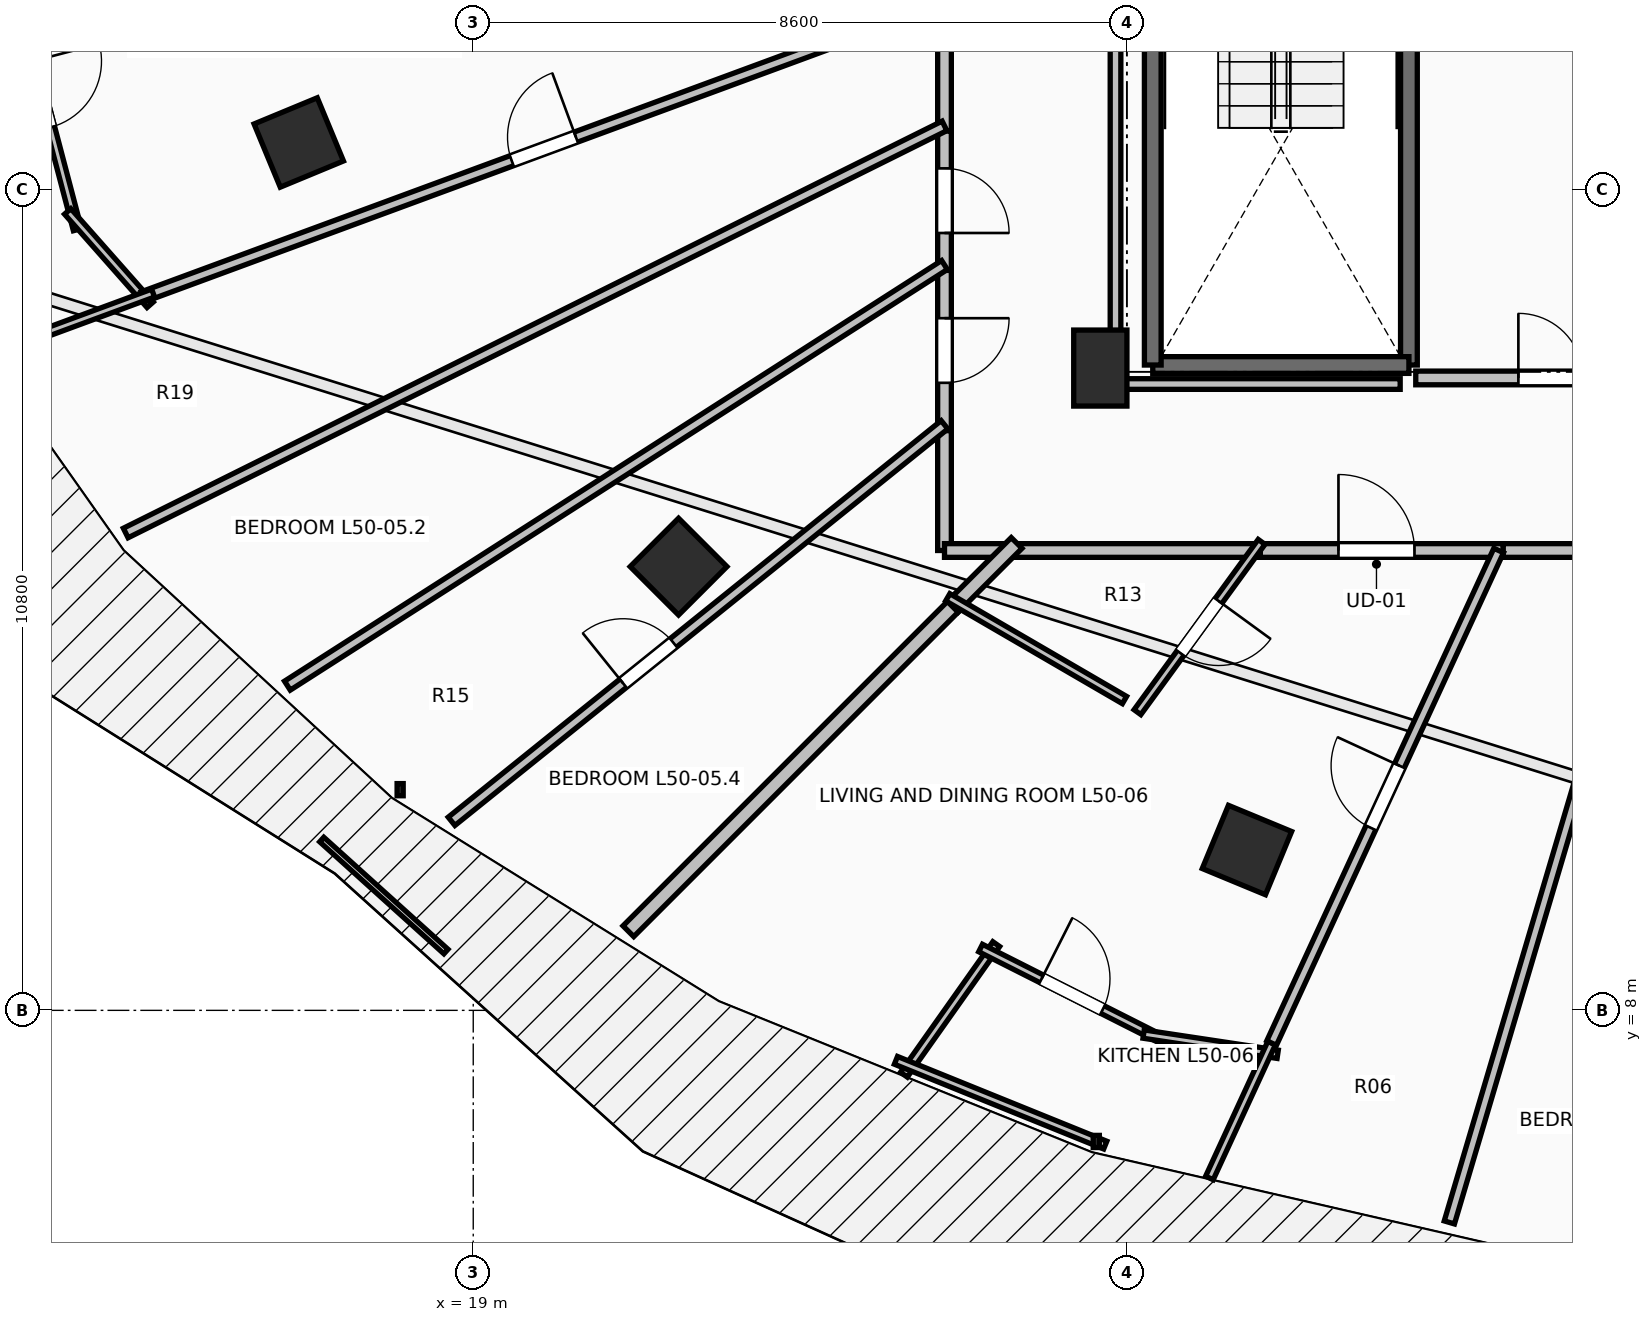
"""IFC4 building model, lengths in metres.
Left out: names, types, materials, properties, quantities, classifications, styles, units other than length and angle.
Written with IfcOpenShell. Run it as: python <this file> out.ifc"""

import sys

from ifc_helpers import new_model, si_unit, direction, frame, frame_2d, origin, origin_2d, place, context, subcontext, project, spatial, rectangle, extrude, element, fill, save


model = new_model("IFC4")
c1 = context("Model", 3, precision=1e-05, world=origin(), true_north=direction((0.0, 1.0)))
c2 = subcontext(c1, "Body", "Model", "MODEL_VIEW")
j1 = project(units=[si_unit("LENGTHUNIT", "METRE"), si_unit("PLANEANGLEUNIT", "RADIAN")], contexts=[c1])
p1 = place(None, origin())
s1 = spatial("IfcSite", under=j1, at=p1, CompositionType="ELEMENT")
p2 = place(p1, origin())
s2 = spatial("IfcBuilding", under=s1, at=p2, CompositionType="ELEMENT")
p3 = place(p2, frame((0.0, 0.0, 186.1)))
s3 = spatial("IfcBuildingStorey", under=s2, at=p3, CompositionType="ELEMENT", Elevation=186.1)
for number, where, z_axis, x_axis in (
    (1, (16.705, 19.418, 0.0), (0.0, 0.0, 1.0), (-0.924, -0.383, 0.0)),
    (2, (21.701, 13.838, 0.0), (0.0, 0.0, 1.0), (-0.707, -0.707, 0.0)),
    (3, (29.179, 10.109, 0.0), (0.0, 0.0, 1.0), (-0.383, -0.924, 0.0)),
):
    element("IfcColumn", number, at=place(p3, frame(where, z_axis=z_axis, x_axis=x_axis)), inside=s3, PredefinedType="COLUMN", context=c2, shape_type="SweptSolid", body=[
        extrude(rectangle(XDim=0.9, YDim=0.9, at=origin_2d()), origin(), (0.0, 0.0, 1.0), 3.5),
    ])
p4 = place(p3, frame((27.25, 16.45, 0.0), z_axis=(0.0, 0.0, 1.0), x_axis=(1.0, 0.0, 0.0)))
e4 = element("IfcColumn", 4, at=p4, inside=s3, PredefinedType="PILASTER", context=c2, shape_type="SweptSolid", body=[
    extrude(rectangle(XDim=0.7, YDim=1.0, at=origin_2d()), origin(), (0.0, 0.0, 1.0), 3.5),
])
p5 = place(p3, frame((31.31, 23.91, 0.0), z_axis=(0.0, 0.0, 1.0), x_axis=(0.0, -1.0, 0.0)))
e5 = element("IfcWall", 5, at=p5, inside=s3, PredefinedType="SOLIDWALL", context=c2, shape_type="SweptSolid", body=[
    extrude(rectangle(XDim=7.42, YDim=0.22, at=frame_2d((3.71, 0.0))), origin(), (0.0, 0.0, 1.0), 3.24),
])
p6 = place(p3, frame((31.31, 16.49, 0.0), z_axis=(0.0, 0.0, 1.0), x_axis=(-1.0, 0.0, 0.0)))
e6 = element("IfcWall", 6, at=p6, inside=s3, PredefinedType="SOLIDWALL", context=c2, shape_type="SweptSolid", body=[
    extrude(rectangle(XDim=3.37, YDim=0.22, at=frame_2d((1.685, 0.0))), origin(), (0.0, 0.0, 1.0), 3.24),
])
p7 = place(p3, frame((27.94, 16.49, 0.0), z_axis=(0.0, 0.0, 1.0), x_axis=(0.0, 1.0, 0.0)))
e7 = element("IfcWall", 7, at=p7, inside=s3, PredefinedType="SOLIDWALL", context=c2, shape_type="SweptSolid", body=[
    extrude(rectangle(XDim=7.42, YDim=0.22, at=frame_2d((3.71, 0.0))), origin(), (0.0, 0.0, 1.0), 3.24),
])
p8 = place(p3, frame((31.4, 16.32, 0.0), z_axis=(0.0, 0.0, 1.0), x_axis=(1.0, 0.0, 0.0)))
e8 = element("IfcWall", 8, at=p8, inside=s3, PredefinedType="PARTITIONING", context=c2, shape_type="SweptSolid", body=[
    extrude(rectangle(XDim=3.55, YDim=0.18, at=frame_2d((1.775, 0.0))), origin(), (0.0, 0.0, 1.0), 3.24),
])
p9 = place(p8, frame((1.35, 0.0, 0.0)))
e9 = element("IfcOpeningElement", 9, at=p9, cuts=e8, PredefinedType="OPENING", context=c2, shape_type="SweptSolid", body=[
    extrude(rectangle(XDim=0.85, YDim=2.1, at=frame_2d((0.425, 1.05))), frame((0.0, 0.105, 0.0), z_axis=(0.0, -1.0, 0.0), x_axis=(1.0, 0.0, 0.0)), (0.0, 0.0, 1.0), 0.21),
])
p10 = place(p3, frame((25.2, 21.214, 0.0), z_axis=(0.0, 0.0, 1.0), x_axis=(0.0, -1.0, 0.0)))
e10 = element("IfcWall", 10, at=p10, inside=s3, PredefinedType="PARTITIONING", context=c2, shape_type="SweptSolid", body=[
    extrude(rectangle(XDim=1.645, YDim=0.18, at=frame_2d((0.823, 0.0))), origin(), (0.0, 0.0, 1.0), 3.24),
])
p11 = place(p3, frame((25.2, 19.569, 0.0), z_axis=(0.0, 0.0, 1.0), x_axis=(0.0, -1.0, 0.0)))
e11 = element("IfcWall", 11, at=p11, inside=s3, PredefinedType="PARTITIONING", context=c2, shape_type="SweptSolid", body=[
    extrude(rectangle(XDim=1.834, YDim=0.18, at=frame_2d((0.917, 0.0))), origin(), (0.0, 0.0, 1.0), 3.24),
])
p12 = place(p11, frame((0.492, 0.0, 0.0)))
e12 = element("IfcOpeningElement", 12, at=p12, cuts=e11, PredefinedType="OPENING", context=c2, shape_type="SweptSolid", body=[
    extrude(rectangle(XDim=0.85, YDim=2.1, at=frame_2d((0.425, 1.05))), frame((0.0, 0.105, 0.0), z_axis=(0.0, -1.0, 0.0), x_axis=(1.0, 0.0, 0.0)), (0.0, 0.0, 1.0), 0.21),
])
p13 = place(p3, frame((25.2, 17.735, 0.0), z_axis=(0.0, 0.0, 1.0), x_axis=(0.0, -1.0, 0.0)))
e13 = element("IfcWall", 13, at=p13, inside=s3, PredefinedType="PARTITIONING", context=c2, shape_type="SweptSolid", body=[
    extrude(rectangle(XDim=2.108, YDim=0.18, at=frame_2d((1.054, 0.0))), origin(), (0.0, 0.0, 1.0), 2.432),
])
p14 = place(p13, frame((0.629, 0.0, 0.0)))
e14 = element("IfcOpeningElement", 14, at=p14, cuts=e13, PredefinedType="OPENING", context=c2, shape_type="SweptSolid", body=[
    extrude(rectangle(XDim=0.85, YDim=2.1, at=frame_2d((0.425, 1.05))), frame((0.0, 0.105, 0.0), z_axis=(0.0, -1.0, 0.0), x_axis=(1.0, 0.0, 0.0)), (0.0, 0.0, 1.0), 0.21),
])
p15 = place(p3, frame((25.2, 15.627, 0.0), z_axis=(0.0, 0.0, 1.0), x_axis=(0.0, -1.0, 0.0)))
e15 = element("IfcWall", 15, at=p15, inside=s3, PredefinedType="PARTITIONING", context=c2, shape_type="SweptSolid", body=[
    extrude(rectangle(XDim=1.577, YDim=0.18, at=frame_2d((0.789, 0.0))), origin(), (0.0, 0.0, 1.0), 2.432),
])
p16 = place(p3, frame((25.2, 14.05, 0.0), z_axis=(0.0, 0.0, 1.0), x_axis=(1.0, 0.0, 0.0)))
e16 = element("IfcWall", 16, at=p16, inside=s3, PredefinedType="PARTITIONING", context=c2, shape_type="SweptSolid", body=[
    extrude(rectangle(XDim=0.91, YDim=0.18, at=frame_2d((0.455, 0.0))), origin(), (0.0, 0.0, 1.0), 2.874),
])
p17 = place(p3, frame((29.215, 14.05, 0.0), z_axis=(0.0, 0.0, 1.0), x_axis=(1.0, 0.0, 0.0)))
e17 = element("IfcWall", 17, at=p17, inside=s3, PredefinedType="PARTITIONING", context=c2, shape_type="SweptSolid", body=[
    extrude(rectangle(XDim=3.336, YDim=0.18, at=frame_2d((1.668, 0.0))), origin(), (0.0, 0.0, 1.0), 3.24),
])
p18 = place(p17, frame((1.168, 0.0, 0.0)))
e18 = element("IfcOpeningElement", 18, at=p18, cuts=e17, PredefinedType="OPENING", context=c2, shape_type="SweptSolid", body=[
    extrude(rectangle(XDim=1.0, YDim=2.15, at=frame_2d((0.5, 1.075))), frame((0.0, 0.105, 0.0), z_axis=(0.0, -1.0, 0.0), x_axis=(1.0, 0.0, 0.0)), (0.0, 0.0, 1.0), 0.21),
])
p19 = place(p3, frame((25.97, 14.05, 0.0), z_axis=(0.0, 0.0, 1.0), x_axis=(1.0, 0.0, 0.0)))
e19 = element("IfcWall", 19, at=p19, inside=s3, PredefinedType="PARTITIONING", context=c2, shape_type="SweptSolid", body=[
    extrude(rectangle(XDim=3.385, YDim=0.18, at=frame_2d((1.692, 0.0))), origin(), (0.0, 0.0, 1.0), 2.432),
])
p20 = place(p3, frame((32.551, 14.05, 0.0), z_axis=(0.0, 0.0, 1.0), x_axis=(1.0, 0.0, 0.0)))
e20 = element("IfcWall", 20, at=p20, inside=s3, PredefinedType="PARTITIONING", context=c2, shape_type="SweptSolid", body=[
    extrude(rectangle(XDim=1.969, YDim=0.18, at=frame_2d((0.984, 0.0))), origin(), (0.0, 0.0, 1.0), 3.24),
])
p21 = place(p3, frame((12.855, 21.834, 0.0), z_axis=(0.0, 0.0, 1.0), x_axis=(0.254271540361, -0.967132867688, 0.0)))
e21 = element("IfcWall", 21, at=p21, inside=s3, PredefinedType="PARTITIONING", context=c2, shape_type="SweptSolid", body=[
    extrude(rectangle(XDim=3.685, YDim=0.11, at=frame_2d((1.843, 0.0))), origin(), (0.0, 0.0, 1.0), 3.24),
])
p22 = place(p21, frame((1.393, 0.0, 0.0)))
e22 = element("IfcOpeningElement", 22, at=p22, cuts=e21, PredefinedType="OPENING", context=c2, shape_type="SweptSolid", body=[
    extrude(rectangle(XDim=0.9, YDim=2.1, at=frame_2d((0.45, 1.05))), frame((0.0, 0.07, 0.0), z_axis=(0.0, -1.0, 0.0), x_axis=(1.0, 0.0, 0.0)), (0.0, 0.0, 1.0), 0.14),
])
p23 = place(p3, frame((13.664, 18.511, 0.0), z_axis=(0.0, 0.0, 1.0), x_axis=(0.662345628205, -0.749198417509, 0.0)))
e23 = element("IfcWall", 23, at=p23, inside=s3, PredefinedType="PARTITIONING", context=c2, shape_type="SweptSolid", body=[
    extrude(rectangle(XDim=1.639, YDim=0.11, at=frame_2d((0.819, 0.0))), origin(), (0.0, 0.0, 1.0), 3.24),
])
p24 = place(p3, frame((14.657, 17.388, 0.0), z_axis=(0.0, 0.0, 1.0), x_axis=(0.938173124492, 0.346166417322, 0.0)))
e24 = element("IfcWall", 24, at=p24, inside=s3, PredefinedType="PARTITIONING", context=c2, shape_type="SweptSolid", body=[
    extrude(rectangle(XDim=11.238, YDim=0.14, at=frame_2d((5.619, 0.0))), origin(), (0.0, 0.0, 1.0), 2.432),
])
p25 = place(p24, frame((5.169, 0.0, 0.0)))
e25 = element("IfcOpeningElement", 25, at=p25, cuts=e24, PredefinedType="OPENING", context=c2, shape_type="SweptSolid", body=[
    extrude(rectangle(XDim=0.9, YDim=2.1, at=frame_2d((0.45, 1.05))), frame((0.0, 0.085, 0.0), z_axis=(0.0, -1.0, 0.0), x_axis=(1.0, 0.0, 0.0)), (0.0, 0.0, 1.0), 0.17),
])
p26 = place(p3, frame((12.604, 16.631, 0.0), z_axis=(0.0, 0.0, 1.0), x_axis=(0.938194450562, 0.346108614361, 0.0)))
e26 = element("IfcWall", 26, at=p26, inside=s3, PredefinedType="PARTITIONING", context=c2, shape_type="SweptSolid", body=[
    extrude(rectangle(XDim=2.328, YDim=0.11, at=frame_2d((1.164, 0.0))), origin(), (0.0, 0.0, 1.0), 3.24),
])
p27 = place(p3, frame((14.428, 14.28, 0.0), z_axis=(0.0, 0.0, 1.0), x_axis=(0.895423439435, 0.44521552546, 0.0)))
e27 = element("IfcWall", 27, at=p27, inside=s3, PredefinedType="PARTITIONING", context=c2, shape_type="SweptSolid", body=[
    extrude(rectangle(XDim=12.03, YDim=0.14, at=frame_2d((6.015, 0.0))), origin(), (0.0, 0.0, 1.0), 2.432),
])
p28 = place(p3, frame((16.555, 12.272, 0.0), z_axis=(0.0, 0.0, 1.0), x_axis=(0.842221721565, 0.539131312135, 0.0)))
e28 = element("IfcWall", 28, at=p28, inside=s3, PredefinedType="PARTITIONING", context=c2, shape_type="SweptSolid", body=[
    extrude(rectangle(XDim=10.265, YDim=0.14, at=frame_2d((5.132, 0.0))), origin(), (0.0, 0.0, 1.0), 2.432),
])
p29 = place(p3, frame((18.715, 10.487, 0.0), z_axis=(0.0, 0.0, 1.0), x_axis=(0.779157389419, 0.626828335762, 0.0)))
e29 = element("IfcWall", 29, at=p29, inside=s3, PredefinedType="PARTITIONING", context=c2, shape_type="SweptSolid", body=[
    extrude(rectangle(XDim=8.323, YDim=0.14, at=frame_2d((4.162, 0.0))), origin(), (0.0, 0.0, 1.0), 2.432),
])
p30 = place(p29, frame((2.896, 0.0, 0.0)))
e30 = element("IfcOpeningElement", 30, at=p30, cuts=e29, PredefinedType="OPENING", context=c2, shape_type="SweptSolid", body=[
    extrude(rectangle(XDim=0.85, YDim=2.1, at=frame_2d((0.425, 1.05))), frame((0.0, 0.085, 0.0), z_axis=(0.0, -1.0, 0.0), x_axis=(1.0, 0.0, 0.0)), (0.0, 0.0, 1.0), 0.17),
])
p31 = place(p3, frame((21.041, 9.041, 0.0), z_axis=(0.0, 0.0, 1.0), x_axis=(0.707106781187, 0.707106781187, 0.0)))
e31 = element("IfcWall", 31, at=p31, inside=s3, PredefinedType="PARTITIONING", context=c2, shape_type="SweptSolid", body=[
    extrude(rectangle(XDim=6.176, YDim=0.2, at=frame_2d((3.088, 0.0))), origin(), (0.0, 0.0, 1.0), 2.774),
])
p32 = place(p3, frame((25.309, 13.309, 0.0), z_axis=(0.0, 0.0, 1.0), x_axis=(0.707106781187, 0.707106781187, 0.0)))
e32 = element("IfcWall", 32, at=p32, inside=s3, PredefinedType="PARTITIONING", context=c2, shape_type="SweptSolid", body=[
    extrude(rectangle(XDim=1.188, YDim=0.2, at=frame_2d((0.594, 0.0))), origin(), (0.0, 0.0, 1.0), 2.874),
])
p33 = place(p3, frame((29.372, 14.163, 0.0), z_axis=(0.0, 0.0, 1.0), x_axis=(-0.589066743954, -0.808084383693, 0.0)))
e33 = element("IfcWall", 33, at=p33, inside=s3, PredefinedType="PARTITIONING", context=c2, shape_type="SweptSolid", body=[
    extrude(rectangle(XDim=2.772, YDim=0.11, at=frame_2d((1.386, 0.0))), origin(), (0.0, 0.0, 1.0), 2.432),
])
p34 = place(p33, frame((0.961, 0.0, 0.0)))
e34 = element("IfcOpeningElement", 34, at=p34, cuts=e33, PredefinedType="OPENING", context=c2, shape_type="SweptSolid", body=[
    extrude(rectangle(XDim=0.85, YDim=2.1, at=frame_2d((0.425, 1.05))), frame((0.0, 0.07, 0.0), z_axis=(0.0, -1.0, 0.0), x_axis=(1.0, 0.0, 0.0)), (0.0, 0.0, 1.0), 0.14),
])
p35 = place(p3, frame((27.568, 12.083, 0.0), z_axis=(0.0, 0.0, 1.0), x_axis=(-0.864515441931, 0.502606258082, 0.0)))
e35 = element("IfcWall", 35, at=p35, inside=s3, PredefinedType="PARTITIONING", context=c2, shape_type="SweptSolid", body=[
    extrude(rectangle(XDim=2.69, YDim=0.11, at=frame_2d((1.345, 0.0))), origin(), (0.0, 0.0, 1.0), 3.24),
])
p36 = place(p3, frame((24.666, 7.154, 0.0), z_axis=(0.0, 0.0, 1.0), x_axis=(0.577389248155, 0.816469017241, 0.0)))
e36 = element("IfcWall", 36, at=p36, inside=s3, PredefinedType="PARTITIONING", context=c2, shape_type="SweptSolid", body=[
    extrude(rectangle(XDim=2.104, YDim=0.11, at=frame_2d((1.052, 0.0))), origin(), (0.0, 0.0, 1.0), 3.24),
])
p37 = place(p3, frame((25.675, 8.82, 0.0), z_axis=(0.0, 0.0, 1.0), x_axis=(0.892628057427, -0.450793911999, 0.0)))
e37 = element("IfcWall", 37, at=p37, inside=s3, PredefinedType="PARTITIONING", context=c2, shape_type="SweptSolid", body=[
    extrude(rectangle(XDim=2.698, YDim=0.11, at=frame_2d((1.349, 0.0))), origin(), (0.0, 0.0, 1.0), 3.24),
])
p38 = place(p37, frame((0.899, 0.0, 0.0)))
e38 = element("IfcOpeningElement", 38, at=p38, cuts=e37, PredefinedType="OPENING", context=c2, shape_type="SweptSolid", body=[
    extrude(rectangle(XDim=0.9, YDim=2.1, at=frame_2d((0.45, 1.05))), frame((0.0, 0.07, 0.0), z_axis=(0.0, -1.0, 0.0), x_axis=(1.0, 0.0, 0.0)), (0.0, 0.0, 1.0), 0.14),
])
p39 = place(p3, frame((27.82, 7.688, 0.0), z_axis=(0.0, 0.0, 1.0), x_axis=(0.988830695744, -0.149043131857, 0.0)))
e39 = element("IfcWall", 39, at=p39, inside=s3, PredefinedType="PARTITIONING", context=c2, shape_type="SweptSolid", body=[
    extrude(rectangle(XDim=1.784, YDim=0.11, at=frame_2d((0.892, 0.0))), origin(), (0.0, 0.0, 1.0), 3.24),
])
p40 = place(p3, frame((29.504, 7.57, 0.0), z_axis=(0.0, 0.0, 1.0), x_axis=(-0.418662115749, -0.908142077451, 0.0)))
e40 = element("IfcWall", 40, at=p40, inside=s3, PredefinedType="PARTITIONING", context=c2, shape_type="SweptSolid", body=[
    extrude(rectangle(XDim=1.955, YDim=0.11, at=frame_2d((0.977, 0.0))), origin(), (0.0, 0.0, 1.0), 3.24),
])
p41 = place(p3, frame((24.561, 7.343, 0.0), z_axis=(0.0, 0.0, 1.0), x_axis=(0.926858319785, -0.375411314487, 0.0)))
e41 = element("IfcWall", 41, at=p41, inside=s3, PredefinedType="PARTITIONING", context=c2, shape_type="SweptSolid", body=[
    extrude(rectangle(XDim=2.971, YDim=0.11, at=frame_2d((1.485, 0.0))), origin(), (0.0, 0.0, 1.0), 3.24),
])
p42 = place(p3, frame((29.504, 7.57, 0.0), z_axis=(0.0, 0.0, 1.0), x_axis=(0.418658902348, 0.908143558852, 0.0)))
e42 = element("IfcWall", 42, at=p42, inside=s3, PredefinedType="PARTITIONING", context=c2, shape_type="SweptSolid", body=[
    extrude(rectangle(XDim=7.135, YDim=0.14, at=frame_2d((3.568, 0.0))), origin(), (0.0, 0.0, 1.0), 2.774),
])
p43 = place(p42, frame((3.118, 0.0, 0.0)))
e43 = element("IfcOpeningElement", 43, at=p43, cuts=e42, PredefinedType="OPENING", context=c2, shape_type="SweptSolid", body=[
    extrude(rectangle(XDim=0.9, YDim=2.1, at=frame_2d((0.45, 1.05))), frame((0.0, 0.085, 0.0), z_axis=(0.0, -1.0, 0.0), x_axis=(1.0, 0.0, 0.0)), (0.0, 0.0, 1.0), 0.17),
])
p44 = place(p3, frame((31.842, 5.21, 0.0), z_axis=(0.0, 0.0, 1.0), x_axis=(0.283952183478, 0.958838441813, 0.0)))
e44 = element("IfcWall", 44, at=p44, inside=s3, PredefinedType="PARTITIONING", context=c2, shape_type="SweptSolid", body=[
    extrude(rectangle(XDim=9.219, YDim=0.14, at=frame_2d((4.61, 0.0))), origin(), (0.0, 0.0, 1.0), 2.774),
])
p45 = place(p3, frame((27.45, 23.754, 0.0), z_axis=(0.0, 0.0, 1.0), x_axis=(0.0, -1.0, 0.0)))
e45 = element("IfcWall", 45, at=p45, inside=s3, PredefinedType="PARTITIONING", context=c2, shape_type="SweptSolid", body=[
    extrude(rectangle(XDim=7.514, YDim=0.14, at=frame_2d((3.757, 0.0))), origin(), (0.0, 0.0, 1.0), 2.432),
])
p46 = place(p3, frame((27.45, 16.24, 0.0), z_axis=(0.0, 0.0, 1.0), x_axis=(1.0, 0.0, 0.0)))
e46 = element("IfcWall", 46, at=p46, inside=s3, PredefinedType="PARTITIONING", context=c2, shape_type="SweptSolid", body=[
    extrude(rectangle(XDim=3.745, YDim=0.14, at=frame_2d((1.873, 0.0))), origin(), (0.0, 0.0, 1.0), 2.432),
])
p47 = place(p9, origin())
e47 = element("IfcDoor", 47, at=p47, inside=s3, OperationType="SINGLE_SWING_LEFT", PredefinedType="DOOR", context=c2, shape_type="SweptSolid", body=[
    extrude(rectangle(XDim=0.85, YDim=2.1, at=frame_2d((0.425, 1.05))), frame((0.0, 0.025, 0.0), z_axis=(0.0, -1.0, 0.0), x_axis=(1.0, 0.0, 0.0)), (0.0, 0.0, 1.0), 0.05),
])
fill(e9, e47)
p48 = place(p18, origin())
e48 = element("IfcDoor", 48, at=p48, inside=s3, OperationType="SINGLE_SWING_LEFT", PredefinedType="DOOR", context=c2, shape_type="SweptSolid", body=[
    extrude(rectangle(XDim=1.0, YDim=2.15, at=frame_2d((0.5, 1.075))), frame((0.0, 0.025, 0.0), z_axis=(0.0, -1.0, 0.0), x_axis=(1.0, 0.0, 0.0)), (0.0, 0.0, 1.0), 0.05),
])
fill(e18, e48)
p49 = place(p22, origin())
e49 = element("IfcDoor", 49, at=p49, inside=s3, OperationType="SINGLE_SWING_LEFT", PredefinedType="DOOR", context=c2, shape_type="SweptSolid", body=[
    extrude(rectangle(XDim=0.9, YDim=2.1, at=frame_2d((0.45, 1.05))), frame((0.0, 0.025, 0.0), z_axis=(0.0, -1.0, 0.0), x_axis=(1.0, 0.0, 0.0)), (0.0, 0.0, 1.0), 0.05),
])
fill(e22, e49)
p50 = place(p25, origin())
e50 = element("IfcDoor", 50, at=p50, inside=s3, OperationType="SINGLE_SWING_RIGHT", PredefinedType="DOOR", context=c2, shape_type="SweptSolid", body=[
    extrude(rectangle(XDim=0.9, YDim=2.1, at=frame_2d((0.45, 1.05))), frame((0.0, 0.025, 0.0), z_axis=(0.0, -1.0, 0.0), x_axis=(1.0, 0.0, 0.0)), (0.0, 0.0, 1.0), 0.05),
])
fill(e25, e50)
p51 = place(p34, origin())
e51 = element("IfcDoor", 51, at=p51, inside=s3, OperationType="SINGLE_SWING_LEFT", PredefinedType="DOOR", context=c2, shape_type="SweptSolid", body=[
    extrude(rectangle(XDim=0.85, YDim=2.1, at=frame_2d((0.425, 1.05))), frame((0.0, 0.025, 0.0), z_axis=(0.0, -1.0, 0.0), x_axis=(1.0, 0.0, 0.0)), (0.0, 0.0, 1.0), 0.05),
])
fill(e34, e51)
p52 = place(p38, origin())
e52 = element("IfcDoor", 52, at=p52, inside=s3, OperationType="SINGLE_SWING_LEFT", PredefinedType="DOOR", context=c2, shape_type="SweptSolid", body=[
    extrude(rectangle(XDim=0.9, YDim=2.1, at=frame_2d((0.45, 1.05))), frame((0.0, 0.025, 0.0), z_axis=(0.0, -1.0, 0.0), x_axis=(1.0, 0.0, 0.0)), (0.0, 0.0, 1.0), 0.05),
])
fill(e38, e52)
p53 = place(p43, origin())
e53 = element("IfcDoor", 53, at=p53, inside=s3, OperationType="SINGLE_SWING_RIGHT", PredefinedType="DOOR", context=c2, shape_type="SweptSolid", body=[
    extrude(rectangle(XDim=0.9, YDim=2.1, at=frame_2d((0.45, 1.05))), frame((0.0, 0.025, 0.0), z_axis=(0.0, -1.0, 0.0), x_axis=(1.0, 0.0, 0.0)), (0.0, 0.0, 1.0), 0.05),
])
fill(e43, e53)
p54 = place(p12, origin())
e54 = element("IfcDoor", 54, at=p54, inside=s3, OperationType="SINGLE_SWING_RIGHT", PredefinedType="DOOR", context=c2, shape_type="SweptSolid", body=[
    extrude(rectangle(XDim=0.85, YDim=2.1, at=frame_2d((0.425, 1.05))), frame((0.0, 0.025, 0.0), z_axis=(0.0, -1.0, 0.0), x_axis=(1.0, 0.0, 0.0)), (0.0, 0.0, 1.0), 0.05),
])
fill(e12, e54)
p55 = place(p14, origin())
e55 = element("IfcDoor", 55, at=p55, inside=s3, OperationType="SINGLE_SWING_LEFT", PredefinedType="DOOR", context=c2, shape_type="SweptSolid", body=[
    extrude(rectangle(XDim=0.85, YDim=2.1, at=frame_2d((0.425, 1.05))), frame((0.0, 0.025, 0.0), z_axis=(0.0, -1.0, 0.0), x_axis=(1.0, 0.0, 0.0)), (0.0, 0.0, 1.0), 0.05),
])
fill(e14, e55)
p56 = place(p30, origin())
e56 = element("IfcDoor", 56, at=p56, inside=s3, OperationType="SINGLE_SWING_LEFT", PredefinedType="DOOR", context=c2, shape_type="SweptSolid", body=[
    extrude(rectangle(XDim=0.85, YDim=2.1, at=frame_2d((0.425, 1.05))), frame((0.0, 0.025, 0.0), z_axis=(0.0, -1.0, 0.0), x_axis=(1.0, 0.0, 0.0)), (0.0, 0.0, 1.0), 0.05),
])
fill(e30, e56)
save(model, sys.argv[1])
